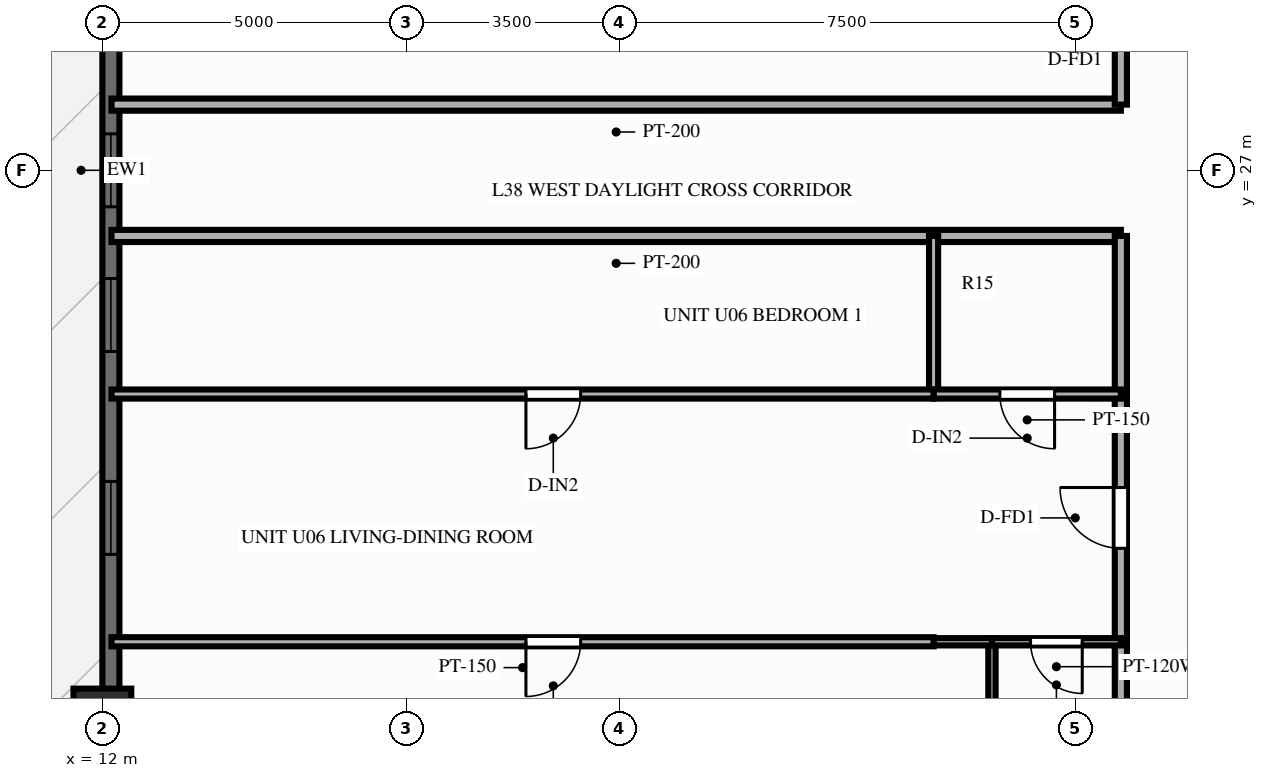
"""IFC4 building model, lengths in metres.
Left out: names, types, materials, properties, quantities, classifications, styles, units other than length and angle.
Written with IfcOpenShell. Run it as: python <this file> out.ifc"""

import sys

from ifc_helpers import new_model, si_unit, direction, frame, frame_2d, origin, origin_2d, place, context, subcontext, project, spatial, rectangle, extrude, source, transform, mapped, element, fill, save


model = new_model("IFC4")
c1 = context("Model", 3, precision=1e-05, world=origin(), true_north=direction((0.0, 1.0)))
c2 = subcontext(c1, "Body", "Model", "MODEL_VIEW")
j1 = project(units=[si_unit("LENGTHUNIT", "METRE"), si_unit("PLANEANGLEUNIT", "RADIAN")], contexts=[c1])
p1 = place(None, origin())
s1 = spatial("IfcSite", under=j1, at=p1, CompositionType="ELEMENT")
p2 = place(p1, origin())
s2 = spatial("IfcBuilding", under=s1, at=p2, CompositionType="ELEMENT")
p3 = place(p2, frame((0.0, 0.0, 119.85)))
s3 = spatial("IfcBuildingStorey", under=s2, at=p3, CompositionType="ELEMENT", Elevation=119.85)
m1 = source(origin(), c2, "Body", "SweptSolid", [
    extrude(rectangle(XDim=0.95, YDim=0.95, at=origin_2d()), origin(), (0.0, 0.0, 1.0), 3.0),
])
p4 = place(p3, frame((12.0, 18.0, 0.0), z_axis=(0.0, 0.0, 1.0), x_axis=(1.0, 0.0, 0.0)))
e1 = element("IfcColumn", 1, at=p4, inside=s3, PredefinedType="COLUMN", context=c2, shape_type="MappedRepresentation", body=[
    mapped(m1, transform((0.0, 0.0, 0.0), scale=1.0)),
])
p5 = place(p3, frame((12.14, 7.2, 0.0), z_axis=(0.0, 0.0, 1.0), x_axis=(0.0, 1.0, 0.0)))
e2 = element("IfcWall", 2, at=p5, inside=s3, PredefinedType="SOLIDWALL", context=c2, shape_type="SweptSolid", body=[
    extrude(rectangle(XDim=39.6, YDim=0.28, at=frame_2d((19.8, 0.0))), origin(), (0.0, 0.0, 1.0), 2.28),
])
p6 = place(p5, frame((0.945, 0.0, 0.25)))
e3 = element("IfcOpeningElement", 3, at=p6, cuts=e2, PredefinedType="OPENING", context=c2, shape_type="SweptSolid", body=[
    extrude(rectangle(XDim=1.2, YDim=1.5, at=frame_2d((0.6, 0.75))), frame((0.0, 0.152, 0.0), z_axis=(0.0, -1.0, 0.0), x_axis=(1.0, 0.0, 0.0)), (0.0, 0.0, 1.0), 0.304),
])
p7 = place(p5, frame((4.213, 0.0, 0.25)))
e4 = element("IfcOpeningElement", 4, at=p7, cuts=e2, PredefinedType="OPENING", context=c2, shape_type="SweptSolid", body=[
    extrude(rectangle(XDim=1.2, YDim=1.5, at=frame_2d((0.6, 0.75))), frame((0.0, 0.152, 0.0), z_axis=(0.0, -1.0, 0.0), x_axis=(1.0, 0.0, 0.0)), (0.0, 0.0, 1.0), 0.304),
])
p8 = place(p5, frame((7.55, 0.0, 0.25)))
e5 = element("IfcOpeningElement", 5, at=p8, cuts=e2, PredefinedType="OPENING", context=c2, shape_type="SweptSolid", body=[
    extrude(rectangle(XDim=1.2, YDim=1.5, at=frame_2d((0.6, 0.75))), frame((0.0, 0.152, 0.0), z_axis=(0.0, -1.0, 0.0), x_axis=(1.0, 0.0, 0.0)), (0.0, 0.0, 1.0), 0.304),
])
p9 = place(p5, frame((13.483, 0.0, 0.25)))
e6 = element("IfcOpeningElement", 6, at=p9, cuts=e2, PredefinedType="OPENING", context=c2, shape_type="SweptSolid", body=[
    extrude(rectangle(XDim=1.2, YDim=1.5, at=frame_2d((0.6, 0.75))), frame((0.0, 0.152, 0.0), z_axis=(0.0, -1.0, 0.0), x_axis=(1.0, 0.0, 0.0)), (0.0, 0.0, 1.0), 0.304),
])
p10 = place(p5, frame((16.82, 0.0, 0.25)))
e7 = element("IfcOpeningElement", 7, at=p10, cuts=e2, PredefinedType="OPENING", context=c2, shape_type="SweptSolid", body=[
    extrude(rectangle(XDim=1.2, YDim=1.5, at=frame_2d((0.6, 0.75))), frame((0.0, 0.152, 0.0), z_axis=(0.0, -1.0, 0.0), x_axis=(1.0, 0.0, 0.0)), (0.0, 0.0, 1.0), 0.304),
])
p11 = place(p5, frame((19.2, 0.0, 0.25)))
e8 = element("IfcOpeningElement", 8, at=p11, cuts=e2, PredefinedType="OPENING", context=c2, shape_type="SweptSolid", body=[
    extrude(rectangle(XDim=1.2, YDim=1.5, at=frame_2d((0.6, 0.75))), frame((0.0, 0.152, 0.0), z_axis=(0.0, -1.0, 0.0), x_axis=(1.0, 0.0, 0.0)), (0.0, 0.0, 1.0), 0.304),
])
p12 = place(p5, frame((21.992, 0.0, 0.0)))
e9 = element("IfcOpeningElement", 9, at=p12, cuts=e2, PredefinedType="OPENING", context=c2, shape_type="SweptSolid", body=[
    extrude(rectangle(XDim=1.6, YDim=2.15, at=frame_2d((0.8, 1.075))), frame((0.0, 0.152, 0.0), z_axis=(0.0, -1.0, 0.0), x_axis=(1.0, 0.0, 0.0)), (0.0, 0.0, 1.0), 0.304),
])
p13 = place(p5, frame((25.529, 0.0, 0.25)))
e10 = element("IfcOpeningElement", 10, at=p13, cuts=e2, PredefinedType="OPENING", context=c2, shape_type="SweptSolid", body=[
    extrude(rectangle(XDim=1.2, YDim=1.5, at=frame_2d((0.6, 0.75))), frame((0.0, 0.152, 0.0), z_axis=(0.0, -1.0, 0.0), x_axis=(1.0, 0.0, 0.0)), (0.0, 0.0, 1.0), 0.304),
])
p14 = place(p5, frame((29.349, 0.0, 0.25)))
e11 = element("IfcOpeningElement", 11, at=p14, cuts=e2, PredefinedType="OPENING", context=c2, shape_type="SweptSolid", body=[
    extrude(rectangle(XDim=0.7, YDim=1.5, at=frame_2d((0.35, 0.75))), frame((0.0, 0.152, 0.0), z_axis=(0.0, -1.0, 0.0), x_axis=(1.0, 0.0, 0.0)), (0.0, 0.0, 1.0), 0.304),
])
p15 = place(p5, frame((31.285, 0.0, 0.25)))
e12 = element("IfcOpeningElement", 12, at=p15, cuts=e2, PredefinedType="OPENING", context=c2, shape_type="SweptSolid", body=[
    extrude(rectangle(XDim=1.2, YDim=1.5, at=frame_2d((0.6, 0.75))), frame((0.0, 0.152, 0.0), z_axis=(0.0, -1.0, 0.0), x_axis=(1.0, 0.0, 0.0)), (0.0, 0.0, 1.0), 0.304),
])
p16 = place(p5, frame((34.252, 0.0, 0.25)))
e13 = element("IfcOpeningElement", 13, at=p16, cuts=e2, PredefinedType="OPENING", context=c2, shape_type="SweptSolid", body=[
    extrude(rectangle(XDim=1.2, YDim=1.5, at=frame_2d((0.6, 0.75))), frame((0.0, 0.152, 0.0), z_axis=(0.0, -1.0, 0.0), x_axis=(1.0, 0.0, 0.0)), (0.0, 0.0, 1.0), 0.304),
])
p17 = place(p5, frame((37.151, 0.0, 0.25)))
e14 = element("IfcOpeningElement", 14, at=p17, cuts=e2, PredefinedType="OPENING", context=c2, shape_type="SweptSolid", body=[
    extrude(rectangle(XDim=1.2, YDim=1.5, at=frame_2d((0.6, 0.75))), frame((0.0, 0.152, 0.0), z_axis=(0.0, -1.0, 0.0), x_axis=(1.0, 0.0, 0.0)), (0.0, 0.0, 1.0), 0.304),
])
p18 = place(p3, frame((28.75, 25.92, 0.0), z_axis=(0.0, 0.0, 1.0), x_axis=(-1.0, 0.0, 0.0)))
e15 = element("IfcWall", 15, at=p18, inside=s3, PredefinedType="PARTITIONING", context=c2, shape_type="SweptSolid", body=[
    extrude(rectangle(XDim=16.6, YDim=0.2, at=frame_2d((8.3, 0.0))), origin(), (0.0, 0.0, 1.0), 2.79),
])
p19 = place(p3, frame((28.75, 16.65, 0.0), z_axis=(0.0, 0.0, 1.0), x_axis=(0.0, 1.0, 0.0)))
e16 = element("IfcWall", 16, at=p19, inside=s3, PredefinedType="PARTITIONING", context=c2, shape_type="SweptSolid", body=[
    extrude(rectangle(XDim=2.596, YDim=0.2, at=frame_2d((1.298, 0.0))), origin(), (0.0, 0.0, 1.0), 2.79),
])
p20 = place(p3, frame((28.75, 19.246, 0.0), z_axis=(0.0, 0.0, 1.0), x_axis=(0.0, 1.0, 0.0)))
e17 = element("IfcWall", 17, at=p20, inside=s3, PredefinedType="PARTITIONING", context=c2, shape_type="SweptSolid", body=[
    extrude(rectangle(XDim=4.074, YDim=0.2, at=frame_2d((2.037, 0.0))), origin(), (0.0, 0.0, 1.0), 2.79),
])
p21 = place(p20, frame((1.537, 0.0, 0.0)))
e18 = element("IfcOpeningElement", 18, at=p21, cuts=e17, PredefinedType="OPENING", context=c2, shape_type="SweptSolid", body=[
    extrude(rectangle(XDim=1.0, YDim=2.15, at=frame_2d((0.5, 1.075))), frame((0.0, 0.112, 0.0), z_axis=(0.0, -1.0, 0.0), x_axis=(1.0, 0.0, 0.0)), (0.0, 0.0, 1.0), 0.224),
])
p22 = place(p3, frame((28.75, 23.32, 0.0), z_axis=(0.0, 0.0, 1.0), x_axis=(0.0, 1.0, 0.0)))
e19 = element("IfcWall", 19, at=p22, inside=s3, PredefinedType="PARTITIONING", context=c2, shape_type="SweptSolid", body=[
    extrude(rectangle(XDim=2.6, YDim=0.2, at=frame_2d((1.3, 0.0))), origin(), (0.0, 0.0, 1.0), 2.79),
])
p23 = place(p3, frame((26.63, 16.65, 0.0), z_axis=(0.0, 0.0, 1.0), x_axis=(0.0, 1.0, 0.0)))
e20 = element("IfcWall", 20, at=p23, inside=s3, PredefinedType="PARTITIONING", context=c2, shape_type="SweptSolid", body=[
    extrude(rectangle(XDim=2.596, YDim=0.12, at=frame_2d((1.298, 0.0))), origin(), (0.0, 0.0, 1.0), 2.79),
])
p24 = place(p3, frame((25.67, 23.32, 0.0), z_axis=(0.0, 0.0, 1.0), x_axis=(0.0, 1.0, 0.0)))
e21 = element("IfcWall", 21, at=p24, inside=s3, PredefinedType="PARTITIONING", context=c2, shape_type="SweptSolid", body=[
    extrude(rectangle(XDim=2.6, YDim=0.15, at=frame_2d((1.3, 0.0))), origin(), (0.0, 0.0, 1.0), 2.79),
])
p25 = place(p3, frame((28.75, 19.246, 0.0), z_axis=(0.0, 0.0, 1.0), x_axis=(-1.0, 0.0, 0.0)))
e22 = element("IfcWall", 22, at=p25, inside=s3, PredefinedType="PARTITIONING", context=c2, shape_type="SweptSolid", body=[
    extrude(rectangle(XDim=2.12, YDim=0.12, at=frame_2d((1.06, 0.0))), origin(), (0.0, 0.0, 1.0), 2.79),
])
p26 = place(p25, frame((0.635, 0.0, 0.0)))
e23 = element("IfcOpeningElement", 23, at=p26, cuts=e22, PredefinedType="OPENING", context=c2, shape_type="SweptSolid", body=[
    extrude(rectangle(XDim=0.85, YDim=2.05, at=frame_2d((0.425, 1.025))), frame((0.0, 0.072, 0.0), z_axis=(0.0, -1.0, 0.0), x_axis=(1.0, 0.0, 0.0)), (0.0, 0.0, 1.0), 0.144),
])
p27 = place(p3, frame((26.63, 19.246, 0.0), z_axis=(0.0, 0.0, 1.0), x_axis=(-1.0, 0.0, 0.0)))
e24 = element("IfcWall", 24, at=p27, inside=s3, PredefinedType="PARTITIONING", context=c2, shape_type="SweptSolid", body=[
    extrude(rectangle(XDim=0.96, YDim=0.12, at=frame_2d((0.48, 0.0))), origin(), (0.0, 0.0, 1.0), 2.79),
])
p28 = place(p3, frame((25.67, 19.246, 0.0), z_axis=(0.0, 0.0, 1.0), x_axis=(-1.0, 0.0, 0.0)))
e25 = element("IfcWall", 25, at=p28, inside=s3, PredefinedType="PARTITIONING", context=c2, shape_type="SweptSolid", body=[
    extrude(rectangle(XDim=13.52, YDim=0.15, at=frame_2d((6.76, 0.0))), origin(), (0.0, 0.0, 1.0), 2.79),
])
p29 = place(p28, frame((5.804, 0.0, 0.0)))
e26 = element("IfcOpeningElement", 26, at=p29, cuts=e25, PredefinedType="OPENING", context=c2, shape_type="SweptSolid", body=[
    extrude(rectangle(XDim=0.9, YDim=2.1, at=frame_2d((0.45, 1.05))), frame((0.0, 0.087, 0.0), z_axis=(0.0, -1.0, 0.0), x_axis=(1.0, 0.0, 0.0)), (0.0, 0.0, 1.0), 0.174),
])
p30 = place(p3, frame((28.75, 23.32, 0.0), z_axis=(0.0, 0.0, 1.0), x_axis=(-1.0, 0.0, 0.0)))
e27 = element("IfcWall", 27, at=p30, inside=s3, PredefinedType="PARTITIONING", context=c2, shape_type="SweptSolid", body=[
    extrude(rectangle(XDim=3.08, YDim=0.15, at=frame_2d((1.54, 0.0))), origin(), (0.0, 0.0, 1.0), 2.79),
])
p31 = place(p30, frame((1.09, 0.0, 0.0)))
e28 = element("IfcOpeningElement", 28, at=p31, cuts=e27, PredefinedType="OPENING", context=c2, shape_type="SweptSolid", body=[
    extrude(rectangle(XDim=0.9, YDim=2.1, at=frame_2d((0.45, 1.05))), frame((0.0, 0.087, 0.0), z_axis=(0.0, -1.0, 0.0), x_axis=(1.0, 0.0, 0.0)), (0.0, 0.0, 1.0), 0.174),
])
p32 = place(p3, frame((25.67, 23.32, 0.0), z_axis=(0.0, 0.0, 1.0), x_axis=(-1.0, 0.0, 0.0)))
e29 = element("IfcWall", 29, at=p32, inside=s3, PredefinedType="PARTITIONING", context=c2, shape_type="SweptSolid", body=[
    extrude(rectangle(XDim=13.52, YDim=0.15, at=frame_2d((6.76, 0.0))), origin(), (0.0, 0.0, 1.0), 2.79),
])
p33 = place(p32, frame((5.804, 0.0, 0.0)))
e30 = element("IfcOpeningElement", 30, at=p33, cuts=e29, PredefinedType="OPENING", context=c2, shape_type="SweptSolid", body=[
    extrude(rectangle(XDim=0.9, YDim=2.1, at=frame_2d((0.45, 1.05))), frame((0.0, 0.087, 0.0), z_axis=(0.0, -1.0, 0.0), x_axis=(1.0, 0.0, 0.0)), (0.0, 0.0, 1.0), 0.174),
])
p34 = place(p3, frame((28.75, 28.08, 0.0), z_axis=(0.0, 0.0, 1.0), x_axis=(-1.0, 0.0, 0.0)))
e31 = element("IfcWall", 31, at=p34, inside=s3, PredefinedType="PARTITIONING", context=c2, shape_type="SweptSolid", body=[
    extrude(rectangle(XDim=16.6, YDim=0.2, at=frame_2d((8.3, 0.0))), origin(), (0.0, 0.0, 1.0), 2.79),
])
p35 = place(p3, frame((28.75, 28.08, 0.0), z_axis=(0.0, 0.0, 1.0), x_axis=(0.0, 1.0, 0.0)))
e32 = element("IfcWall", 32, at=p35, inside=s3, PredefinedType="PARTITIONING", context=c2, shape_type="SweptSolid", body=[
    extrude(rectangle(XDim=3.824, YDim=0.2, at=frame_2d((1.912, 0.0))), origin(), (0.0, 0.0, 1.0), 2.79),
])
p36 = place(p35, frame((1.412, 0.0, 0.0)))
e33 = element("IfcOpeningElement", 33, at=p36, cuts=e32, PredefinedType="OPENING", context=c2, shape_type="SweptSolid", body=[
    extrude(rectangle(XDim=1.0, YDim=2.15, at=frame_2d((0.5, 1.075))), frame((0.0, 0.112, 0.0), z_axis=(0.0, -1.0, 0.0), x_axis=(1.0, 0.0, 0.0)), (0.0, 0.0, 1.0), 0.224),
])
m2 = source(origin(), c2, "Body", "SweptSolid", [
    extrude(rectangle(XDim=1.2, YDim=1.5, at=frame_2d((0.6, 0.75))), frame((0.0, 0.03, 0.0), z_axis=(0.0, -1.0, 0.0), x_axis=(1.0, 0.0, 0.0)), (0.0, 0.0, 1.0), 0.06),
])
p37 = place(p9, origin())
e34 = element("IfcWindow", 34, at=p37, inside=s3, PartitioningType="SINGLE_PANEL", PredefinedType="WINDOW", context=c2, shape_type="MappedRepresentation", body=[
    mapped(m2, transform((0.0, 0.0, 0.0), scale=1.0)),
])
fill(e6, e34)
p38 = place(p10, origin())
e35 = element("IfcWindow", 35, at=p38, inside=s3, PartitioningType="SINGLE_PANEL", PredefinedType="WINDOW", context=c2, shape_type="MappedRepresentation", body=[
    mapped(m2, transform((0.0, 0.0, 0.0), scale=1.0)),
])
fill(e7, e35)
p39 = place(p11, origin())
e36 = element("IfcWindow", 36, at=p39, inside=s3, PartitioningType="SINGLE_PANEL", PredefinedType="WINDOW", context=c2, shape_type="MappedRepresentation", body=[
    mapped(m2, transform((0.0, 0.0, 0.0), scale=1.0)),
])
fill(e8, e36)
m3 = source(origin(), c2, "Body", "SweptSolid", [
    extrude(rectangle(XDim=1.0, YDim=2.15, at=frame_2d((0.5, 1.075))), frame((0.0, 0.025, 0.0), z_axis=(0.0, -1.0, 0.0), x_axis=(1.0, 0.0, 0.0)), (0.0, 0.0, 1.0), 0.05),
])
p40 = place(p21, origin())
e37 = element("IfcDoor", 37, at=p40, inside=s3, OperationType="SINGLE_SWING_RIGHT", PredefinedType="DOOR", context=c2, shape_type="MappedRepresentation", body=[
    mapped(m3, transform((0.0, 0.0, 0.0), scale=1.0)),
])
fill(e18, e37)
m4 = source(origin(), c2, "Body", "SweptSolid", [
    extrude(rectangle(XDim=0.85, YDim=2.05, at=frame_2d((0.425, 1.025))), frame((0.0, 0.025, 0.0), z_axis=(0.0, -1.0, 0.0), x_axis=(1.0, 0.0, 0.0)), (0.0, 0.0, 1.0), 0.05),
])
p41 = place(p26, origin())
e38 = element("IfcDoor", 38, at=p41, inside=s3, OperationType="SINGLE_SWING_LEFT", PredefinedType="DOOR", context=c2, shape_type="MappedRepresentation", body=[
    mapped(m4, transform((0.0, 0.0, 0.0), scale=1.0)),
])
fill(e23, e38)
m5 = source(origin(), c2, "Body", "SweptSolid", [
    extrude(rectangle(XDim=0.9, YDim=2.1, at=frame_2d((0.45, 1.05))), frame((0.0, 0.025, 0.0), z_axis=(0.0, -1.0, 0.0), x_axis=(1.0, 0.0, 0.0)), (0.0, 0.0, 1.0), 0.05),
])
p42 = place(p29, origin())
e39 = element("IfcDoor", 39, at=p42, inside=s3, OperationType="SINGLE_SWING_RIGHT", PredefinedType="DOOR", context=c2, shape_type="MappedRepresentation", body=[
    mapped(m5, transform((0.0, 0.0, 0.0), scale=1.0)),
])
fill(e26, e39)
p43 = place(p31, origin())
e40 = element("IfcDoor", 40, at=p43, inside=s3, OperationType="SINGLE_SWING_LEFT", PredefinedType="DOOR", context=c2, shape_type="MappedRepresentation", body=[
    mapped(m5, transform((0.0, 0.0, 0.0), scale=1.0)),
])
fill(e28, e40)
p44 = place(p33, origin())
e41 = element("IfcDoor", 41, at=p44, inside=s3, OperationType="SINGLE_SWING_RIGHT", PredefinedType="DOOR", context=c2, shape_type="MappedRepresentation", body=[
    mapped(m5, transform((0.0, 0.0, 0.0), scale=1.0)),
])
fill(e30, e41)
save(model, sys.argv[1])
